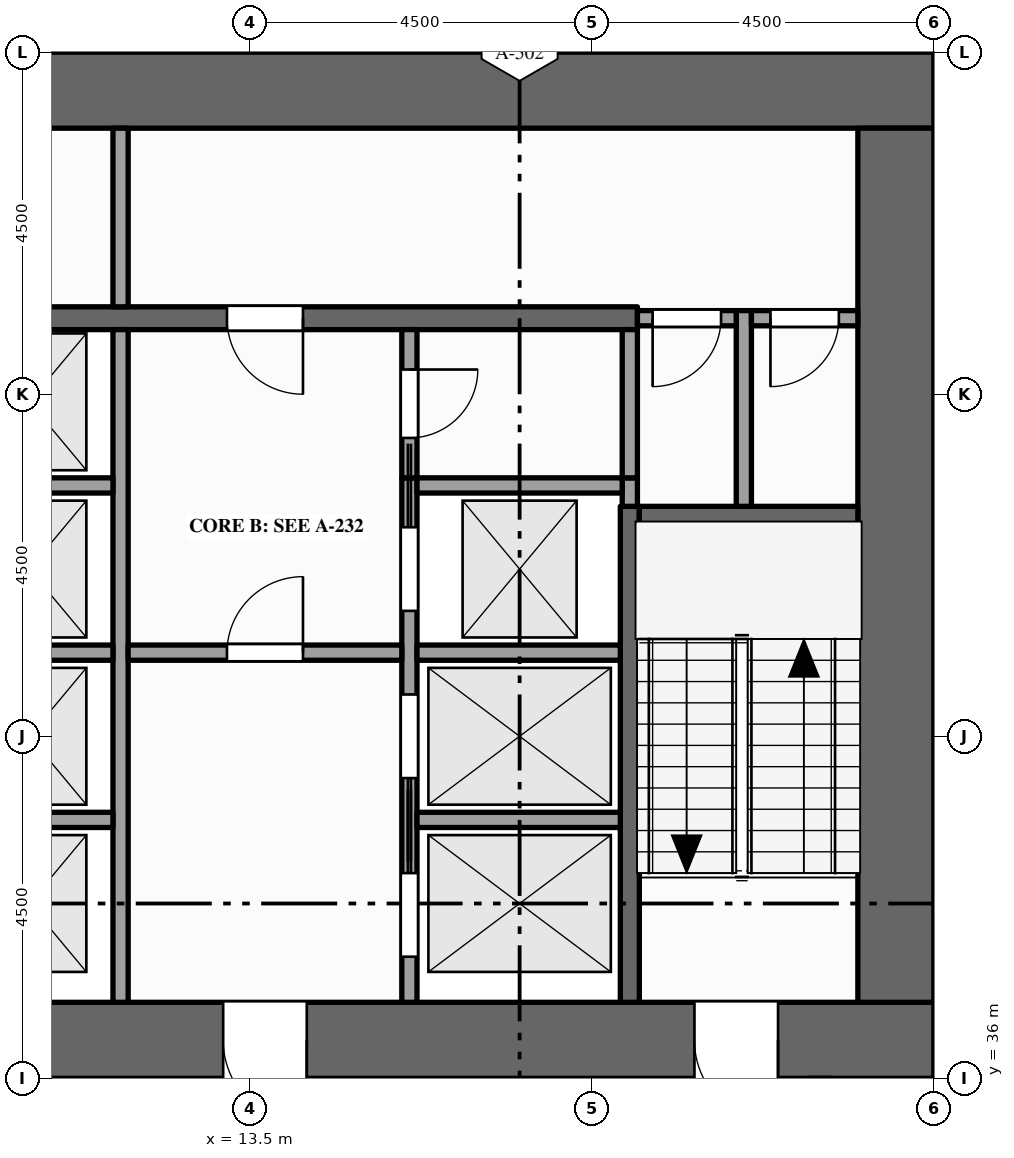
"""IFC4 building model, lengths in metres.
Left out: names, types, materials, properties, quantities, classifications, styles, units other than length and angle.
Written with IfcOpenShell. Run it as: python <this file> out.ifc"""

import sys

from ifc_helpers import new_model, si_unit, direction, frame, frame_2d, origin, place, context, subcontext, project, spatial, rectangle, extrude, element, fill, save


model = new_model("IFC4")
c1 = context("Model", 3, precision=1e-05, world=origin(), true_north=direction((0.0, 1.0)))
c2 = subcontext(c1, "Body", "Model", "MODEL_VIEW")
j1 = project(units=[si_unit("LENGTHUNIT", "METRE"), si_unit("PLANEANGLEUNIT", "RADIAN")], contexts=[c1])
p1 = place(None, origin())
s1 = spatial("IfcSite", under=j1, at=p1, CompositionType="ELEMENT")
p2 = place(p1, origin())
s2 = spatial("IfcBuilding", under=s1, at=p2, CompositionType="ELEMENT")
p3 = place(p2, frame((0.0, 0.0, 179.0)))
s3 = spatial("IfcBuildingStorey", under=s2, at=p3, CompositionType="ELEMENT", Elevation=179.0)
p4 = place(p3, frame((0.0, 36.5, -0.15), z_axis=(0.0, 0.0, 1.0), x_axis=(1.0, 0.0, 0.0)))
e1 = element("IfcWall", 1, at=p4, inside=s3, PredefinedType="SHEAR", context=c2, shape_type="SweptSolid", body=[
    extrude(rectangle(XDim=22.5, YDim=1.0, at=frame_2d((11.25, 0.0))), origin(), (0.0, 0.0, 1.0), 4.0),
])
p5 = place(p4, frame((7.1, 0.0, 0.15)))
e2 = element("IfcOpeningElement", 2, at=p5, cuts=e1, PredefinedType="OPENING", context=c2, shape_type="SweptSolid", body=[
    extrude(rectangle(XDim=1.8, YDim=2.1, at=frame_2d((0.9, 1.05))), frame((0.0, 0.51, 0.0), z_axis=(0.0, -1.0, 0.0), x_axis=(1.0, 0.0, 0.0)), (0.0, 0.0, 1.0), 1.02),
])
p6 = place(p4, frame((13.15, 0.0, 0.15)))
e3 = element("IfcOpeningElement", 3, at=p6, cuts=e1, PredefinedType="OPENING", context=c2, shape_type="SweptSolid", body=[
    extrude(rectangle(XDim=1.1, YDim=2.1, at=frame_2d((0.55, 1.05))), frame((0.0, 0.51, 0.0), z_axis=(0.0, -1.0, 0.0), x_axis=(1.0, 0.0, 0.0)), (0.0, 0.0, 1.0), 1.02),
])
p7 = place(p4, frame((2.15, 0.0, 0.15)))
e4 = element("IfcOpeningElement", 4, at=p7, cuts=e1, PredefinedType="OPENING", context=c2, shape_type="SweptSolid", body=[
    extrude(rectangle(XDim=1.1, YDim=2.1, at=frame_2d((0.55, 1.05))), frame((0.0, 0.51, 0.0), z_axis=(0.0, -1.0, 0.0), x_axis=(1.0, 0.0, 0.0)), (0.0, 0.0, 1.0), 1.02),
])
p8 = place(p4, frame((19.35, 0.0, 0.15)))
e5 = element("IfcOpeningElement", 5, at=p8, cuts=e1, PredefinedType="OPENING", context=c2, shape_type="SweptSolid", body=[
    extrude(rectangle(XDim=1.1, YDim=2.1, at=frame_2d((0.55, 1.05))), frame((0.0, 0.51, 0.0), z_axis=(0.0, -1.0, 0.0), x_axis=(1.0, 0.0, 0.0)), (0.0, 0.0, 1.0), 1.02),
])
p9 = place(p3, frame((0.0, 49.0, -0.15), z_axis=(0.0, 0.0, 1.0), x_axis=(1.0, 0.0, 0.0)))
e6 = element("IfcWall", 6, at=p9, inside=s3, PredefinedType="SHEAR", context=c2, shape_type="SweptSolid", body=[
    extrude(rectangle(XDim=22.5, YDim=1.0, at=frame_2d((11.25, 0.0))), origin(), (0.0, 0.0, 1.0), 4.0),
])
p10 = place(p3, frame((22.0, 37.0, -0.15), z_axis=(0.0, 0.0, 1.0), x_axis=(0.0, 1.0, 0.0)))
e7 = element("IfcWall", 7, at=p10, inside=s3, PredefinedType="SHEAR", context=c2, shape_type="SweptSolid", body=[
    extrude(rectangle(XDim=11.5, YDim=1.0, at=frame_2d((5.75, 0.0))), origin(), (0.0, 0.0, 1.0), 4.0),
])
p11 = place(p3, frame((11.8, 37.0, 0.0), z_axis=(0.0, 0.0, 1.0), x_axis=(0.0, 1.0, 0.0)))
e8 = element("IfcWall", 8, at=p11, inside=s3, PredefinedType="SOLIDWALL", context=c2, shape_type="SweptSolid", body=[
    extrude(rectangle(XDim=8.85, YDim=0.2, at=frame_2d((4.425, 0.0))), origin(), (0.0, 0.0, 1.0), 3.85),
])
p12 = place(p3, frame((11.8, 46.15, 0.0), z_axis=(0.0, 0.0, 1.0), x_axis=(0.0, 1.0, 0.0)))
e9 = element("IfcWall", 9, at=p12, inside=s3, PredefinedType="PARTITIONING", context=c2, shape_type="SweptSolid", body=[
    extrude(rectangle(XDim=2.35, YDim=0.2, at=frame_2d((1.175, 0.0))), origin(), (0.0, 0.0, 1.0), 3.85),
])
p13 = place(p3, frame((15.6, 37.0, 0.0), z_axis=(0.0, 0.0, 1.0), x_axis=(0.0, 1.0, 0.0)))
e10 = element("IfcWall", 10, at=p13, inside=s3, PredefinedType="SOLIDWALL", context=c2, shape_type="SweptSolid", body=[
    extrude(rectangle(XDim=6.9, YDim=0.2, at=frame_2d((3.45, 0.0))), origin(), (0.0, 0.0, 1.0), 3.85),
])
p14 = place(p13, frame((0.6, 0.0, 0.012)))
e11 = element("IfcOpeningElement", 11, at=p14, cuts=e10, PredefinedType="OPENING", context=c2, shape_type="SweptSolid", body=[
    extrude(rectangle(XDim=1.1, YDim=2.1, at=frame_2d((0.55, 1.05))), frame((0.0, 0.11, 0.0), z_axis=(0.0, -1.0, 0.0), x_axis=(1.0, 0.0, 0.0)), (0.0, 0.0, 1.0), 0.22),
])
p15 = place(p13, frame((2.95, 0.0, 0.012)))
e12 = element("IfcOpeningElement", 12, at=p15, cuts=e10, PredefinedType="OPENING", context=c2, shape_type="SweptSolid", body=[
    extrude(rectangle(XDim=1.1, YDim=2.1, at=frame_2d((0.55, 1.05))), frame((0.0, 0.11, 0.0), z_axis=(0.0, -1.0, 0.0), x_axis=(1.0, 0.0, 0.0)), (0.0, 0.0, 1.0), 0.22),
])
p16 = place(p13, frame((5.15, 0.0, 0.012)))
e13 = element("IfcOpeningElement", 13, at=p16, cuts=e10, PredefinedType="OPENING", context=c2, shape_type="SweptSolid", body=[
    extrude(rectangle(XDim=1.1, YDim=2.1, at=frame_2d((0.55, 1.05))), frame((0.0, 0.11, 0.0), z_axis=(0.0, -1.0, 0.0), x_axis=(1.0, 0.0, 0.0)), (0.0, 0.0, 1.0), 0.22),
])
p17 = place(p3, frame((15.6, 43.9, 0.0), z_axis=(0.0, 0.0, 1.0), x_axis=(0.0, 1.0, 0.0)))
e14 = element("IfcWall", 14, at=p17, inside=s3, PredefinedType="PARTITIONING", context=c2, shape_type="SweptSolid", body=[
    extrude(rectangle(XDim=1.95, YDim=0.2, at=frame_2d((0.975, 0.0))), origin(), (0.0, 0.0, 1.0), 3.85),
])
p18 = place(p17, frame((0.525, 0.0, 0.0)))
e15 = element("IfcOpeningElement", 15, at=p18, cuts=e14, PredefinedType="OPENING", context=c2, shape_type="SweptSolid", body=[
    extrude(rectangle(XDim=0.9, YDim=2.1, at=frame_2d((0.45, 1.05))), frame((0.0, 0.11, 0.0), z_axis=(0.0, -1.0, 0.0), x_axis=(1.0, 0.0, 0.0)), (0.0, 0.0, 1.0), 0.22),
])
p19 = place(p3, frame((18.5, 37.0, 0.0), z_axis=(0.0, 0.0, 1.0), x_axis=(0.0, 1.0, 0.0)))
e16 = element("IfcWall", 16, at=p19, inside=s3, PredefinedType="SHEAR", context=c2, shape_type="SweptSolid", body=[
    extrude(rectangle(XDim=6.525, YDim=0.25, at=frame_2d((3.262, 0.0))), origin(), (0.0, 0.0, 1.0), 3.85),
])
p20 = place(p3, frame((18.5, 43.525, 0.0), z_axis=(0.0, 0.0, 1.0), x_axis=(0.0, 1.0, 0.0)))
e17 = element("IfcWall", 17, at=p20, inside=s3, PredefinedType="SOLIDWALL", context=c2, shape_type="SweptSolid", body=[
    extrude(rectangle(XDim=0.375, YDim=0.2, at=frame_2d((0.188, 0.0))), origin(), (0.0, 0.0, 1.0), 3.85),
])
p21 = place(p3, frame((18.5, 43.9, 0.0), z_axis=(0.0, 0.0, 1.0), x_axis=(0.0, 1.0, 0.0)))
e18 = element("IfcWall", 18, at=p21, inside=s3, PredefinedType="PARTITIONING", context=c2, shape_type="SweptSolid", body=[
    extrude(rectangle(XDim=1.95, YDim=0.2, at=frame_2d((0.975, 0.0))), origin(), (0.0, 0.0, 1.0), 3.85),
])
p22 = place(p3, frame((20.0, 43.525, 0.0), z_axis=(0.0, 0.0, 1.0), x_axis=(0.0, 1.0, 0.0)))
e19 = element("IfcWall", 19, at=p22, inside=s3, PredefinedType="PARTITIONING", context=c2, shape_type="SweptSolid", body=[
    extrude(rectangle(XDim=2.575, YDim=0.2, at=frame_2d((1.288, 0.0))), origin(), (0.0, 0.0, 1.0), 3.85),
])
p23 = place(p3, frame((9.5, 39.4, 0.0), z_axis=(0.0, 0.0, 1.0), x_axis=(1.0, 0.0, 0.0)))
e20 = element("IfcWall", 20, at=p23, inside=s3, PredefinedType="SOLIDWALL", context=c2, shape_type="SweptSolid", body=[
    extrude(rectangle(XDim=2.2, YDim=0.2, at=frame_2d((1.1, 0.0))), origin(), (0.0, 0.0, 1.0), 3.85),
])
p24 = place(p3, frame((15.7, 39.4, 0.0), z_axis=(0.0, 0.0, 1.0), x_axis=(1.0, 0.0, 0.0)))
e21 = element("IfcWall", 21, at=p24, inside=s3, PredefinedType="SOLIDWALL", context=c2, shape_type="SweptSolid", body=[
    extrude(rectangle(XDim=2.675, YDim=0.2, at=frame_2d((1.337, 0.0))), origin(), (0.0, 0.0, 1.0), 3.85),
])
p25 = place(p3, frame((9.5, 41.6, 0.0), z_axis=(0.0, 0.0, 1.0), x_axis=(1.0, 0.0, 0.0)))
e22 = element("IfcWall", 22, at=p25, inside=s3, PredefinedType="SOLIDWALL", context=c2, shape_type="SweptSolid", body=[
    extrude(rectangle(XDim=2.2, YDim=0.2, at=frame_2d((1.1, 0.0))), origin(), (0.0, 0.0, 1.0), 3.85),
])
p26 = place(p3, frame((11.9, 41.6, 0.0), z_axis=(0.0, 0.0, 1.0), x_axis=(1.0, 0.0, 0.0)))
e23 = element("IfcWall", 23, at=p26, inside=s3, PredefinedType="PARTITIONING", context=c2, shape_type="SweptSolid", body=[
    extrude(rectangle(XDim=3.6, YDim=0.2, at=frame_2d((1.8, 0.0))), origin(), (0.0, 0.0, 1.0), 3.85),
])
p27 = place(p26, frame((1.3, 0.0, 0.0)))
e24 = element("IfcOpeningElement", 24, at=p27, cuts=e23, PredefinedType="OPENING", context=c2, shape_type="SweptSolid", body=[
    extrude(rectangle(XDim=1.0, YDim=2.1, at=frame_2d((0.5, 1.05))), frame((0.0, 0.11, 0.0), z_axis=(0.0, -1.0, 0.0), x_axis=(1.0, 0.0, 0.0)), (0.0, 0.0, 1.0), 0.22),
])
p28 = place(p3, frame((15.7, 41.6, 0.0), z_axis=(0.0, 0.0, 1.0), x_axis=(1.0, 0.0, 0.0)))
e25 = element("IfcWall", 25, at=p28, inside=s3, PredefinedType="SOLIDWALL", context=c2, shape_type="SweptSolid", body=[
    extrude(rectangle(XDim=2.675, YDim=0.2, at=frame_2d((1.337, 0.0))), origin(), (0.0, 0.0, 1.0), 3.85),
])
p29 = place(p3, frame((18.625, 43.4, 0.0), z_axis=(0.0, 0.0, 1.0), x_axis=(1.0, 0.0, 0.0)))
e26 = element("IfcWall", 26, at=p29, inside=s3, PredefinedType="SHEAR", context=c2, shape_type="SweptSolid", body=[
    extrude(rectangle(XDim=2.875, YDim=0.25, at=frame_2d((1.438, 0.0))), origin(), (0.0, 0.0, 1.0), 3.85),
])
p30 = place(p3, frame((9.5, 43.8, 0.0), z_axis=(0.0, 0.0, 1.0), x_axis=(1.0, 0.0, 0.0)))
e27 = element("IfcWall", 27, at=p30, inside=s3, PredefinedType="SOLIDWALL", context=c2, shape_type="SweptSolid", body=[
    extrude(rectangle(XDim=2.2, YDim=0.2, at=frame_2d((1.1, 0.0))), origin(), (0.0, 0.0, 1.0), 3.85),
])
p31 = place(p3, frame((15.7, 43.8, 0.0), z_axis=(0.0, 0.0, 1.0), x_axis=(1.0, 0.0, 0.0)))
e28 = element("IfcWall", 28, at=p31, inside=s3, PredefinedType="SOLIDWALL", context=c2, shape_type="SweptSolid", body=[
    extrude(rectangle(XDim=2.7, YDim=0.2, at=frame_2d((1.35, 0.0))), origin(), (0.0, 0.0, 1.0), 3.85),
])
p32 = place(p3, frame((4.1, 46.0, 0.0), z_axis=(0.0, 0.0, 1.0), x_axis=(1.0, 0.0, 0.0)))
e29 = element("IfcWall", 29, at=p32, inside=s3, PredefinedType="SHEAR", context=c2, shape_type="SweptSolid", body=[
    extrude(rectangle(XDim=14.5, YDim=0.3, at=frame_2d((7.25, 0.0))), origin(), (0.0, 0.0, 1.0), 3.85),
])
p33 = place(p32, frame((3.4, 0.0, 0.0)))
e30 = element("IfcOpeningElement", 30, at=p33, cuts=e29, PredefinedType="OPENING", context=c2, shape_type="SweptSolid", body=[
    extrude(rectangle(XDim=1.0, YDim=2.1, at=frame_2d((0.5, 1.05))), frame((0.0, 0.16, 0.0), z_axis=(0.0, -1.0, 0.0), x_axis=(1.0, 0.0, 0.0)), (0.0, 0.0, 1.0), 0.32),
])
p34 = place(p32, frame((9.1, 0.0, 0.0)))
e31 = element("IfcOpeningElement", 31, at=p34, cuts=e29, PredefinedType="OPENING", context=c2, shape_type="SweptSolid", body=[
    extrude(rectangle(XDim=1.0, YDim=2.1, at=frame_2d((0.5, 1.05))), frame((0.0, 0.16, 0.0), z_axis=(0.0, -1.0, 0.0), x_axis=(1.0, 0.0, 0.0)), (0.0, 0.0, 1.0), 0.32),
])
p35 = place(p3, frame((18.6, 46.0, 0.0), z_axis=(0.0, 0.0, 1.0), x_axis=(1.0, 0.0, 0.0)))
e32 = element("IfcWall", 32, at=p35, inside=s3, PredefinedType="PARTITIONING", context=c2, shape_type="SweptSolid", body=[
    extrude(rectangle(XDim=1.3, YDim=0.2, at=frame_2d((0.65, 0.0))), origin(), (0.0, 0.0, 1.0), 3.85),
])
p36 = place(p35, frame((0.2, 0.0, 0.0)))
e33 = element("IfcOpeningElement", 33, at=p36, cuts=e32, PredefinedType="OPENING", context=c2, shape_type="SweptSolid", body=[
    extrude(rectangle(XDim=0.9, YDim=2.1, at=frame_2d((0.45, 1.05))), frame((0.0, 0.11, 0.0), z_axis=(0.0, -1.0, 0.0), x_axis=(1.0, 0.0, 0.0)), (0.0, 0.0, 1.0), 0.22),
])
p37 = place(p3, frame((20.1, 46.0, 0.0), z_axis=(0.0, 0.0, 1.0), x_axis=(1.0, 0.0, 0.0)))
e34 = element("IfcWall", 34, at=p37, inside=s3, PredefinedType="PARTITIONING", context=c2, shape_type="SweptSolid", body=[
    extrude(rectangle(XDim=1.4, YDim=0.2, at=frame_2d((0.7, 0.0))), origin(), (0.0, 0.0, 1.0), 3.85),
])
p38 = place(p37, frame((0.25, 0.0, 0.0)))
e35 = element("IfcOpeningElement", 35, at=p38, cuts=e34, PredefinedType="OPENING", context=c2, shape_type="SweptSolid", body=[
    extrude(rectangle(XDim=0.9, YDim=2.1, at=frame_2d((0.45, 1.05))), frame((0.0, 0.11, 0.0), z_axis=(0.0, -1.0, 0.0), x_axis=(1.0, 0.0, 0.0)), (0.0, 0.0, 1.0), 0.22),
])
p39 = place(p14, origin())
e36 = element("IfcDoor", 36, at=p39, inside=s3, OperationType="SLIDING_TO_RIGHT", PredefinedType="DOOR", context=c2, shape_type="SweptSolid", body=[
    extrude(rectangle(XDim=1.1, YDim=2.1, at=frame_2d((0.55, 1.05))), frame((0.0, 0.025, 0.0), z_axis=(0.0, -1.0, 0.0), x_axis=(1.0, 0.0, 0.0)), (0.0, 0.0, 1.0), 0.05),
])
fill(e11, e36)
p40 = place(p15, origin())
e37 = element("IfcDoor", 37, at=p40, inside=s3, OperationType="SLIDING_TO_LEFT", PredefinedType="DOOR", context=c2, shape_type="SweptSolid", body=[
    extrude(rectangle(XDim=1.1, YDim=2.1, at=frame_2d((0.55, 1.05))), frame((0.0, 0.025, 0.0), z_axis=(0.0, -1.0, 0.0), x_axis=(1.0, 0.0, 0.0)), (0.0, 0.0, 1.0), 0.05),
])
fill(e12, e37)
p41 = place(p16, origin())
e38 = element("IfcDoor", 38, at=p41, inside=s3, OperationType="SLIDING_TO_RIGHT", PredefinedType="DOOR", context=c2, shape_type="SweptSolid", body=[
    extrude(rectangle(XDim=1.1, YDim=2.1, at=frame_2d((0.55, 1.05))), frame((0.0, 0.025, 0.0), z_axis=(0.0, -1.0, 0.0), x_axis=(1.0, 0.0, 0.0)), (0.0, 0.0, 1.0), 0.05),
])
fill(e13, e38)
p42 = place(p6, origin())
e39 = element("IfcDoor", 39, at=p42, inside=s3, OperationType="SINGLE_SWING_RIGHT", PredefinedType="DOOR", context=c2, shape_type="SweptSolid", body=[
    extrude(rectangle(XDim=1.1, YDim=2.1, at=frame_2d((0.55, 1.05))), frame((0.0, 0.025, 0.0), z_axis=(0.0, -1.0, 0.0), x_axis=(1.0, 0.0, 0.0)), (0.0, 0.0, 1.0), 0.05),
])
fill(e3, e39)
p43 = place(p27, origin())
e40 = element("IfcDoor", 40, at=p43, inside=s3, OperationType="SINGLE_SWING_RIGHT", PredefinedType="DOOR", context=c2, shape_type="SweptSolid", body=[
    extrude(rectangle(XDim=1.0, YDim=2.1, at=frame_2d((0.5, 1.05))), frame((0.0, 0.025, 0.0), z_axis=(0.0, -1.0, 0.0), x_axis=(1.0, 0.0, 0.0)), (0.0, 0.0, 1.0), 0.05),
])
fill(e24, e40)
p44 = place(p34, origin())
e41 = element("IfcDoor", 41, at=p44, inside=s3, OperationType="SINGLE_SWING_RIGHT", PredefinedType="DOOR", context=c2, shape_type="SweptSolid", body=[
    extrude(rectangle(XDim=1.0, YDim=2.1, at=frame_2d((0.5, 1.05))), frame((0.0, 0.025, 0.0), z_axis=(0.0, -1.0, 0.0), x_axis=(1.0, 0.0, 0.0)), (0.0, 0.0, 1.0), 0.05),
])
fill(e31, e41)
p45 = place(p8, origin())
e42 = element("IfcDoor", 42, at=p45, inside=s3, OperationType="SINGLE_SWING_RIGHT", PredefinedType="DOOR", context=c2, shape_type="SweptSolid", body=[
    extrude(rectangle(XDim=1.1, YDim=2.1, at=frame_2d((0.55, 1.05))), frame((0.0, 0.025, 0.0), z_axis=(0.0, -1.0, 0.0), x_axis=(1.0, 0.0, 0.0)), (0.0, 0.0, 1.0), 0.05),
])
fill(e5, e42)
p46 = place(p36, origin())
e43 = element("IfcDoor", 43, at=p46, inside=s3, OperationType="SINGLE_SWING_LEFT", PredefinedType="DOOR", context=c2, shape_type="SweptSolid", body=[
    extrude(rectangle(XDim=0.9, YDim=2.1, at=frame_2d((0.45, 1.05))), frame((0.0, 0.025, 0.0), z_axis=(0.0, -1.0, 0.0), x_axis=(1.0, 0.0, 0.0)), (0.0, 0.0, 1.0), 0.05),
])
fill(e33, e43)
p47 = place(p38, origin())
e44 = element("IfcDoor", 44, at=p47, inside=s3, OperationType="SINGLE_SWING_LEFT", PredefinedType="DOOR", context=c2, shape_type="SweptSolid", body=[
    extrude(rectangle(XDim=0.9, YDim=2.1, at=frame_2d((0.45, 1.05))), frame((0.0, 0.025, 0.0), z_axis=(0.0, -1.0, 0.0), x_axis=(1.0, 0.0, 0.0)), (0.0, 0.0, 1.0), 0.05),
])
fill(e35, e44)
p48 = place(p18, origin())
e45 = element("IfcDoor", 45, at=p48, inside=s3, OperationType="SINGLE_SWING_RIGHT", PredefinedType="DOOR", context=c2, shape_type="SweptSolid", body=[
    extrude(rectangle(XDim=0.9, YDim=2.1, at=frame_2d((0.45, 1.05))), frame((0.0, 0.025, 0.0), z_axis=(0.0, -1.0, 0.0), x_axis=(1.0, 0.0, 0.0)), (0.0, 0.0, 1.0), 0.05),
])
fill(e15, e45)
save(model, sys.argv[1])
